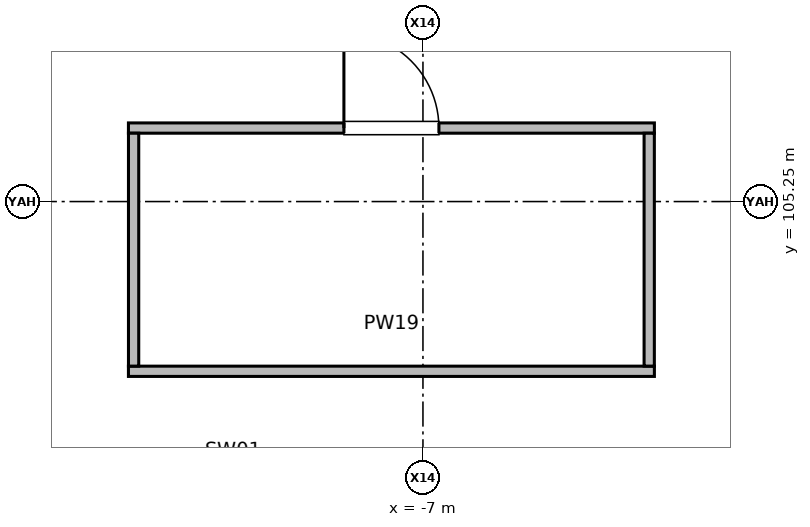
"""IFC4 building model, lengths in metres.
Left out: names, types, materials, properties, quantities, classifications, styles, units other than length and angle.
Written with IfcOpenShell. Run it as: python <this file> out.ifc"""

import sys

from ifc_helpers import new_model, si_unit, direction, frame, frame_2d, origin, place, context, subcontext, project, spatial, rectangle, extrude, element, fill, save


model = new_model("IFC4")
c1 = context("Model", 3, precision=1e-05, world=origin(), true_north=direction((0.0, 1.0)))
c2 = subcontext(c1, "Body", "Model", "MODEL_VIEW")
j1 = project(units=[si_unit("LENGTHUNIT", "METRE"), si_unit("PLANEANGLEUNIT", "RADIAN")], contexts=[c1])
p1 = place(None, origin())
s1 = spatial("IfcSite", under=j1, at=p1, CompositionType="ELEMENT")
p2 = place(p1, origin())
s2 = spatial("IfcBuilding", under=s1, at=p2, CompositionType="ELEMENT")
p3 = place(p2, frame((0.0, 0.0, 11.4)))
s3 = spatial("IfcBuildingStorey", under=s2, at=p3, CompositionType="ELEMENT", Elevation=11.4)
p4 = place(p3, frame((-10.875, 106.217, 0.0), z_axis=(0.0, 0.0, 1.0), x_axis=(1.0, 0.0, 0.0)))
e1 = element("IfcWall", 1, at=p4, inside=s3, PredefinedType="PARTITIONING", context=c2, shape_type="SweptSolid", body=[
    extrude(rectangle(XDim=6.92, YDim=0.135, at=frame_2d((3.46, 0.0))), origin(), (0.0, 0.0, 1.0), 3.82),
])
p5 = place(p4, frame((2.835, 0.0, 0.0)))
e2 = element("IfcOpeningElement", 2, at=p5, cuts=e1, PredefinedType="OPENING", context=c2, shape_type="SweptSolid", body=[
    extrude(rectangle(XDim=1.25, YDim=2.2, at=frame_2d((0.625, 1.1))), frame((0.0, 0.077, 0.0), z_axis=(0.0, -1.0, 0.0), x_axis=(1.0, 0.0, 0.0)), (0.0, 0.0, 1.0), 0.155),
])
p6 = place(p3, frame((-10.875, 103.017, 0.0), z_axis=(0.0, 0.0, 1.0), x_axis=(1.0, 0.0, 0.0)))
e3 = element("IfcWall", 3, at=p6, inside=s3, PredefinedType="PARTITIONING", context=c2, shape_type="SweptSolid", body=[
    extrude(rectangle(XDim=6.92, YDim=0.135, at=frame_2d((3.46, 0.0))), origin(), (0.0, 0.0, 1.0), 3.82),
])
for number, where, z_axis, x_axis in (
    (4, (-10.807, 103.085, 0.0), (0.0, 0.0, 1.0), (0.0, 1.0, 0.0)),
    (5, (-4.023, 103.085, 0.0), (0.0, 0.0, 1.0), (0.0, 1.0, 0.0)),
):
    element("IfcWall", number, at=place(p3, frame(where, z_axis=z_axis, x_axis=x_axis)), inside=s3, PredefinedType="PARTITIONING", context=c2, shape_type="SweptSolid", body=[
        extrude(rectangle(XDim=3.064, YDim=0.135, at=frame_2d((1.532, 0.0))), origin(), (0.0, 0.0, 1.0), 3.475),
    ])
p7 = place(p5, origin())
e6 = element("IfcDoor", 6, at=p7, inside=s3, OperationType="SINGLE_SWING_LEFT", PredefinedType="DOOR", context=c2, shape_type="SweptSolid", body=[
    extrude(rectangle(XDim=1.25, YDim=2.2, at=frame_2d((0.625, 1.1))), frame((0.0, 0.025, 0.0), z_axis=(0.0, -1.0, 0.0), x_axis=(1.0, 0.0, 0.0)), (0.0, 0.0, 1.0), 0.05),
])
fill(e2, e6)
save(model, sys.argv[1])
